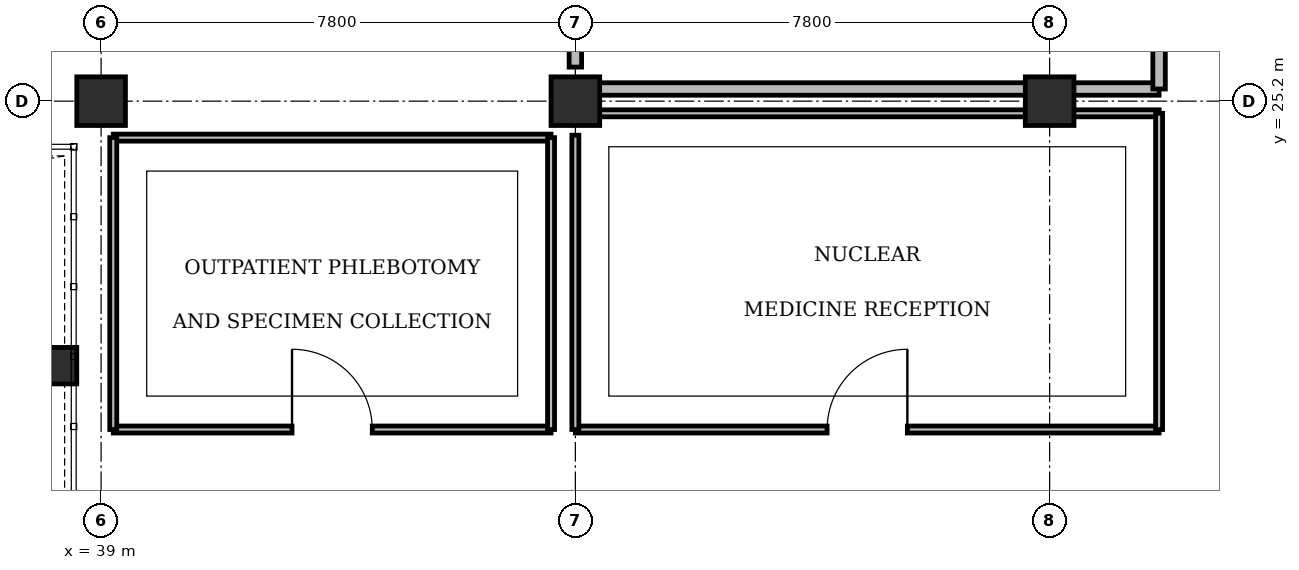
"""IFC4 building model, lengths in metres.
Left out: names, types, materials, properties, quantities, classifications, styles, units other than length and angle.
Written with IfcOpenShell. Run it as: python <this file> out.ifc"""

import sys

from ifc_helpers import new_model, si_unit, direction, frame, frame_2d, origin, origin_2d, place, context, subcontext, project, spatial, rectangle, circle, extrude, element, fill, save


model = new_model("IFC4")
c1 = context("Model", 3, precision=1e-05, world=origin(), true_north=direction((0.0, 1.0)))
c2 = subcontext(c1, "Body", "Model", "MODEL_VIEW")
j1 = project(units=[si_unit("LENGTHUNIT", "METRE"), si_unit("PLANEANGLEUNIT", "RADIAN")], contexts=[c1])
p1 = place(None, origin())
s1 = spatial("IfcSite", under=j1, at=p1, CompositionType="ELEMENT")
p2 = place(p1, origin())
s2 = spatial("IfcBuilding", under=s1, at=p2, CompositionType="ELEMENT")
p3 = place(p2, origin())
s3 = spatial("IfcBuildingStorey", under=s2, at=p3, CompositionType="ELEMENT", Elevation=0.0)
for number, where, z_axis, x_axis in (
    (1, (39.0, 25.2, 0.0), (0.0, 0.0, 1.0), (1.0, 0.0, 0.0)),
    (2, (46.8, 25.2, 0.0), (0.0, 0.0, 1.0), (1.0, 0.0, 0.0)),
    (3, (54.6, 25.2, 0.0), (0.0, 0.0, 1.0), (1.0, 0.0, 0.0)),
):
    element("IfcColumn", number, at=place(p3, frame(where, z_axis=z_axis, x_axis=x_axis)), inside=s3, PredefinedType="COLUMN", context=c2, shape_type="SweptSolid", body=[
        extrude(rectangle(XDim=0.8, YDim=0.8, at=origin_2d()), origin(), (0.0, 0.0, 1.0), 4.8),
    ])
p4 = place(p3, frame((38.3, 20.85, 0.0), z_axis=(0.0, 0.0, 1.0), x_axis=(1.0, 0.0, 0.0)))
e4 = element("IfcColumn", 4, at=p4, inside=s3, PredefinedType="PILASTER", context=c2, shape_type="SweptSolid", body=[
    extrude(circle(Radius=0.3, at=origin_2d()), origin(), (0.0, 0.0, 1.0), 4.8),
])
p5 = place(p3, frame((39.2, 19.8, 0.0), z_axis=(0.0, 0.0, 1.0), x_axis=(1.0, 0.0, 0.0)))
e5 = element("IfcWall", 5, at=p5, inside=s3, PredefinedType="PARTITIONING", context=c2, shape_type="SweptSolid", body=[
    extrude(rectangle(XDim=7.2, YDim=0.115, at=frame_2d((3.6, 0.0))), origin(), (0.0, 0.0, 1.0), 4.46),
])
p6 = place(p5, frame((2.94, 0.0, 0.0)))
e6 = element("IfcOpeningElement", 6, at=p6, cuts=e5, PredefinedType="OPENING", context=c2, shape_type="SweptSolid", body=[
    extrude(rectangle(XDim=1.32, YDim=2.15, at=frame_2d((0.66, 1.075))), frame((0.0, 0.067, 0.0), z_axis=(0.0, -1.0, 0.0), x_axis=(1.0, 0.0, 0.0)), (0.0, 0.0, 1.0), 0.135),
])
p7 = place(p3, frame((39.2, 24.6, 0.0), z_axis=(0.0, 0.0, 1.0), x_axis=(1.0, 0.0, 0.0)))
e7 = element("IfcWall", 7, at=p7, inside=s3, PredefinedType="PARTITIONING", context=c2, shape_type="SweptSolid", body=[
    extrude(rectangle(XDim=7.2, YDim=0.115, at=frame_2d((3.6, 0.0))), origin(), (0.0, 0.0, 1.0), 4.46),
])
p8 = place(p3, frame((39.2, 19.8, 0.0), z_axis=(0.0, 0.0, 1.0), x_axis=(0.0, 1.0, 0.0)))
e8 = element("IfcWall", 8, at=p8, inside=s3, PredefinedType="PARTITIONING", context=c2, shape_type="SweptSolid", body=[
    extrude(rectangle(XDim=4.8, YDim=0.115, at=frame_2d((2.4, 0.0))), origin(), (0.0, 0.0, 1.0), 3.615),
])
p9 = place(p3, frame((46.4, 19.8, 0.0), z_axis=(0.0, 0.0, 1.0), x_axis=(0.0, 1.0, 0.0)))
e9 = element("IfcWall", 9, at=p9, inside=s3, PredefinedType="PARTITIONING", context=c2, shape_type="SweptSolid", body=[
    extrude(rectangle(XDim=4.8, YDim=0.115, at=frame_2d((2.4, 0.0))), origin(), (0.0, 0.0, 1.0), 3.63),
])
p10 = place(p3, frame((46.8, 19.8, 0.0), z_axis=(0.0, 0.0, 1.0), x_axis=(1.0, 0.0, 0.0)))
e10 = element("IfcWall", 10, at=p10, inside=s3, PredefinedType="PARTITIONING", context=c2, shape_type="SweptSolid", body=[
    extrude(rectangle(XDim=9.6, YDim=0.115, at=frame_2d((4.8, 0.0))), origin(), (0.0, 0.0, 1.0), 4.46),
])
p11 = place(p10, frame((4.14, 0.0, 0.0)))
e11 = element("IfcOpeningElement", 11, at=p11, cuts=e10, PredefinedType="OPENING", context=c2, shape_type="SweptSolid", body=[
    extrude(rectangle(XDim=1.32, YDim=2.15, at=frame_2d((0.66, 1.075))), frame((0.0, 0.067, 0.0), z_axis=(0.0, -1.0, 0.0), x_axis=(1.0, 0.0, 0.0)), (0.0, 0.0, 1.0), 0.135),
])
p12 = place(p3, frame((47.16, 25.0, 0.0), z_axis=(0.0, 0.0, 1.0), x_axis=(1.0, 0.0, 0.0)))
e12 = element("IfcWall", 12, at=p12, inside=s3, PredefinedType="PARTITIONING", context=c2, shape_type="SweptSolid", body=[
    extrude(rectangle(XDim=9.24, YDim=0.115, at=frame_2d((4.62, 0.0))), origin(), (0.0, 0.0, 1.0), 3.63),
])
p13 = place(p3, frame((46.8, 19.8, 0.0), z_axis=(0.0, 0.0, 1.0), x_axis=(0.0, 1.0, 0.0)))
e13 = element("IfcWall", 13, at=p13, inside=s3, PredefinedType="PARTITIONING", context=c2, shape_type="SweptSolid", body=[
    extrude(rectangle(XDim=4.84, YDim=0.115, at=frame_2d((2.42, 0.0))), origin(), (0.0, 0.0, 1.0), 3.615),
])
p14 = place(p3, frame((56.4, 19.8, 0.0), z_axis=(0.0, 0.0, 1.0), x_axis=(0.0, 1.0, 0.0)))
e14 = element("IfcWall", 14, at=p14, inside=s3, PredefinedType="PARTITIONING", context=c2, shape_type="SweptSolid", body=[
    extrude(rectangle(XDim=5.2, YDim=0.115, at=frame_2d((2.6, 0.0))), origin(), (0.0, 0.0, 1.0), 4.46),
])
p15 = place(p3, frame((47.16, 25.4, 0.0), z_axis=(0.0, 0.0, 1.0), x_axis=(1.0, 0.0, 0.0)))
e15 = element("IfcWall", 15, at=p15, inside=s3, PredefinedType="PARTITIONING", context=c2, shape_type="SweptSolid", body=[
    extrude(rectangle(XDim=9.24, YDim=0.205, at=frame_2d((4.62, 0.0))), origin(), (0.0, 0.0, 1.0), 3.63),
])
p16 = place(p3, frame((46.8, 25.76, 0.0), z_axis=(0.0, 0.0, 1.0), x_axis=(0.0, 1.0, 0.0)))
e16 = element("IfcWall", 16, at=p16, inside=s3, PredefinedType="PARTITIONING", context=c2, shape_type="SweptSolid", body=[
    extrude(rectangle(XDim=23.88, YDim=0.205, at=frame_2d((11.94, 0.0))), origin(), (0.0, 0.0, 1.0), 3.615),
])
p17 = place(p3, frame((56.4, 25.4, 0.0), z_axis=(0.0, 0.0, 1.0), x_axis=(0.0, 1.0, 0.0)))
e17 = element("IfcWall", 17, at=p17, inside=s3, PredefinedType="PARTITIONING", context=c2, shape_type="SweptSolid", body=[
    extrude(rectangle(XDim=24.6, YDim=0.205, at=frame_2d((12.3, 0.0))), origin(), (0.0, 0.0, 1.0), 4.46),
])
p18 = place(p17, frame((11.6, 0.0, 0.0)))
e18 = element("IfcOpeningElement", 18, at=p18, cuts=e17, PredefinedType="OPENING", context=c2, shape_type="SweptSolid", body=[
    extrude(rectangle(XDim=1.4, YDim=2.25, at=frame_2d((0.7, 1.125))), frame((0.0, 0.113, 0.0), z_axis=(0.0, -1.0, 0.0), x_axis=(1.0, 0.0, 0.0)), (0.0, 0.0, 1.0), 0.225),
])
p19 = place(p6, origin())
e19 = element("IfcDoor", 19, at=p19, inside=s3, OperationType="SINGLE_SWING_LEFT", PredefinedType="DOOR", context=c2, shape_type="SweptSolid", body=[
    extrude(rectangle(XDim=1.32, YDim=2.15, at=frame_2d((0.66, 1.075))), frame((0.0, 0.025, 0.0), z_axis=(0.0, -1.0, 0.0), x_axis=(1.0, 0.0, 0.0)), (0.0, 0.0, 1.0), 0.05),
])
fill(e6, e19)
p20 = place(p11, origin())
e20 = element("IfcDoor", 20, at=p20, inside=s3, OperationType="SINGLE_SWING_RIGHT", PredefinedType="DOOR", context=c2, shape_type="SweptSolid", body=[
    extrude(rectangle(XDim=1.32, YDim=2.15, at=frame_2d((0.66, 1.075))), frame((0.0, 0.025, 0.0), z_axis=(0.0, -1.0, 0.0), x_axis=(1.0, 0.0, 0.0)), (0.0, 0.0, 1.0), 0.05),
])
fill(e11, e20)
save(model, sys.argv[1])
